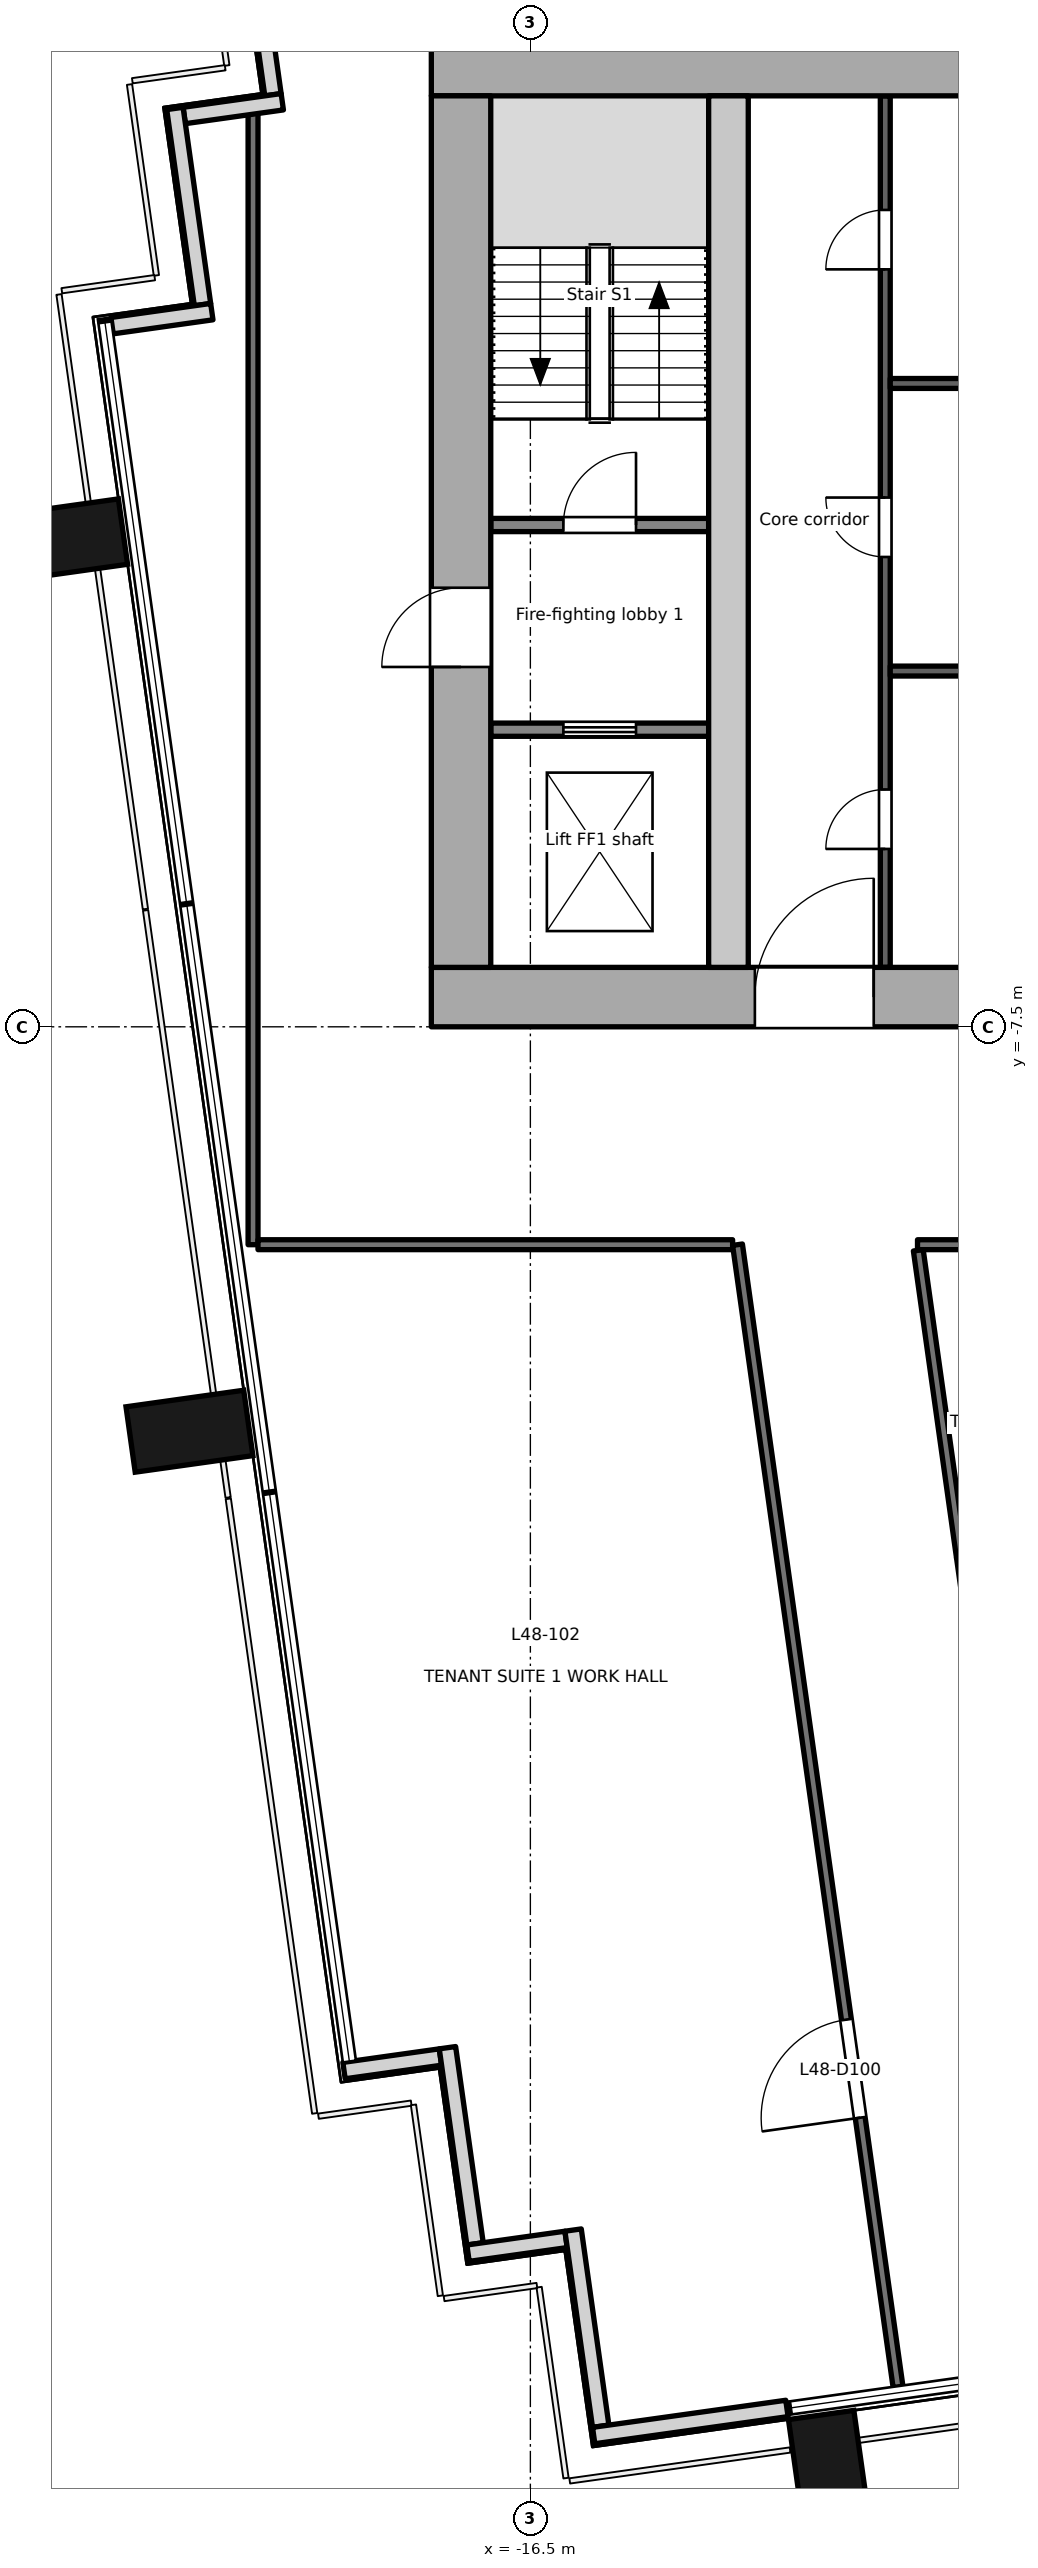
"""IFC4 building model, lengths in metres.
Left out: names, types, materials, properties, quantities, classifications, styles, units other than length and angle.
Written with IfcOpenShell. Run it as: python <this file> out.ifc"""

import sys

from ifc_helpers import new_model, si_unit, direction, frame, frame_2d, origin, origin_2d, place, context, subcontext, project, spatial, rectangle, extrude, element, fill, save


model = new_model("IFC4")
c1 = context("Model", 3, precision=1e-05, world=origin(), true_north=direction((0.0, 1.0)))
c2 = subcontext(c1, "Body", "Model", "MODEL_VIEW")
j1 = project(units=[si_unit("LENGTHUNIT", "METRE"), si_unit("PLANEANGLEUNIT", "RADIAN")], contexts=[c1])
p1 = place(None, origin())
s1 = spatial("IfcSite", under=j1, at=p1, CompositionType="ELEMENT")
p2 = place(p1, origin())
s2 = spatial("IfcBuilding", under=s1, at=p2, CompositionType="ELEMENT")
p3 = place(p2, frame((0.0, 0.0, 213.5)))
s3 = spatial("IfcBuildingStorey", under=s2, at=p3, CompositionType="ELEMENT", Elevation=213.5)
for number, where, z_axis, x_axis in (
    (1, (-11.971, -29.416, -0.2), (0.0, 0.0, 1.0), (0.99, 0.139, 0.0)),
    (2, (-21.663, -13.625, -0.2), (0.0, 0.0, 1.0), (-0.139, 0.99, 0.0)),
    (3, (-23.561, -0.125, -0.2), (0.0, 0.0, 1.0), (-0.139, 0.99, 0.0)),
):
    element("IfcColumn", number, at=place(p3, frame(where, z_axis=z_axis, x_axis=x_axis)), inside=s3, PredefinedType="COLUMN", context=c2, shape_type="SweptSolid", body=[
        extrude(rectangle(XDim=1.0, YDim=1.8, at=origin_2d()), origin(), (0.0, 0.0, 1.0), 3.9),
    ])
p4 = place(p3, frame((-20.815, 9.588, 0.0), z_axis=(0.0, 0.0, 1.0), x_axis=(0.138983028379, -0.9902947631, 0.0)))
e4 = element("IfcWall", 4, at=p4, inside=s3, PredefinedType="SOLIDWALL", context=c2, shape_type="SweptSolid", body=[
    extrude(rectangle(XDim=3.0, YDim=0.25, at=frame_2d((1.5, 0.0))), origin(), (0.0, 0.0, 1.0), 3.7),
])
p5 = place(p3, frame((-20.257, 6.51, 0.0), z_axis=(0.0, 0.0, 1.0), x_axis=(-0.990330117064, -0.138730887823, 0.0)))
e5 = element("IfcWall", 5, at=p5, inside=s3, PredefinedType="SOLIDWALL", context=c2, shape_type="SweptSolid", body=[
    extrude(rectangle(XDim=1.499, YDim=0.25, at=frame_2d((0.75, 0.0))), origin(), (0.0, 0.0, 1.0), 3.7),
])
p6 = place(p3, frame((-21.883, 6.409, 0.0), z_axis=(0.0, 0.0, 1.0), x_axis=(0.139324658755, -0.990246756855, 0.0)))
e6 = element("IfcWall", 6, at=p6, inside=s3, PredefinedType="SOLIDWALL", context=c2, shape_type="SweptSolid", body=[
    extrude(rectangle(XDim=3.0, YDim=0.25, at=frame_2d((1.5, 0.0))), origin(), (0.0, 0.0, 1.0), 3.7),
])
p7 = place(p3, frame((-21.324, 3.332, 0.0), z_axis=(0.0, 0.0, 1.0), x_axis=(-0.990238641016, -0.139382329723, 0.0)))
e7 = element("IfcWall", 7, at=p7, inside=s3, PredefinedType="SOLIDWALL", context=c2, shape_type="SweptSolid", body=[
    extrude(rectangle(XDim=1.526, YDim=0.25, at=frame_2d((0.763, 0.0))), origin(), (0.0, 0.0, 1.0), 3.7),
])
p8 = place(p3, frame((-19.322, -23.309, 0.0), z_axis=(0.0, 0.0, 1.0), x_axis=(0.990235520307, 0.13940449893, 0.0)))
e8 = element("IfcWall", 8, at=p8, inside=s3, PredefinedType="SOLIDWALL", context=c2, shape_type="SweptSolid", body=[
    extrude(rectangle(XDim=1.475, YDim=0.25, at=frame_2d((0.737, 0.0))), origin(), (0.0, 0.0, 1.0), 3.7),
])
p9 = place(p3, frame((-17.756, -22.962, 0.0), z_axis=(0.0, 0.0, 1.0), x_axis=(0.139393225799, -0.990237107263, 0.0)))
e9 = element("IfcWall", 9, at=p9, inside=s3, PredefinedType="SOLIDWALL", context=c2, shape_type="SweptSolid", body=[
    extrude(rectangle(XDim=3.0, YDim=0.25, at=frame_2d((1.5, 0.0))), origin(), (0.0, 0.0, 1.0), 3.7),
])
p10 = place(p3, frame((-17.444, -26.074, 0.0), z_axis=(0.0, 0.0, 1.0), x_axis=(0.990240434918, 0.139369584395, 0.0)))
e10 = element("IfcWall", 10, at=p10, inside=s3, PredefinedType="SOLIDWALL", context=c2, shape_type="SweptSolid", body=[
    extrude(rectangle(XDim=1.5, YDim=0.25, at=frame_2d((0.75, 0.0))), origin(), (0.0, 0.0, 1.0), 3.7),
])
p11 = place(p3, frame((-15.853, -25.724, 0.0), z_axis=(0.0, 0.0, 1.0), x_axis=(0.139302206688, -0.990249915532, 0.0)))
e11 = element("IfcWall", 11, at=p11, inside=s3, PredefinedType="SOLIDWALL", context=c2, shape_type="SweptSolid", body=[
    extrude(rectangle(XDim=3.0, YDim=0.25, at=frame_2d((1.5, 0.0))), origin(), (0.0, 0.0, 1.0), 3.7),
])
p12 = place(p3, frame((-15.541, -28.836, 0.0), z_axis=(0.0, 0.0, 1.0), x_axis=(0.990285396533, 0.139049751574, 0.0)))
e12 = element("IfcWall", 12, at=p12, inside=s3, PredefinedType="SOLIDWALL", context=c2, shape_type="SweptSolid", body=[
    extrude(rectangle(XDim=2.955, YDim=0.25, at=frame_2d((1.478, 0.0))), origin(), (0.0, 0.0, 1.0), 3.7),
])
p13 = place(p3, frame((-18.0, -7.05, -0.2), z_axis=(0.0, 0.0, 1.0), x_axis=(1.0, 0.0, 0.0)))
e13 = element("IfcWall", 13, at=p13, inside=s3, PredefinedType="SHEAR", context=c2, shape_type="SweptSolid", body=[
    extrude(rectangle(XDim=36.0, YDim=0.9, at=frame_2d((18.0, 0.0))), origin(), (0.0, 0.0, 1.0), 3.9),
])
p14 = place(p13, frame((4.9, 0.0, 0.2)))
e14 = element("IfcOpeningElement", 14, at=p14, cuts=e13, PredefinedType="OPENING", context=c2, shape_type="SweptSolid", body=[
    extrude(rectangle(XDim=1.8, YDim=2.1, at=frame_2d((0.9, 1.05))), frame((0.0, 0.46, 0.0), z_axis=(0.0, -1.0, 0.0), x_axis=(1.0, 0.0, 0.0)), (0.0, 0.0, 1.0), 0.921),
])
p15 = place(p13, frame((16.8, 0.0, 0.2)))
e15 = element("IfcOpeningElement", 15, at=p15, cuts=e13, PredefinedType="OPENING", context=c2, shape_type="SweptSolid", body=[
    extrude(rectangle(XDim=2.4, YDim=2.1, at=frame_2d((1.2, 1.05))), frame((0.0, 0.46, 0.0), z_axis=(0.0, -1.0, 0.0), x_axis=(1.0, 0.0, 0.0)), (0.0, 0.0, 1.0), 0.921),
])
p16 = place(p13, frame((26.1, 0.0, 0.2)))
e16 = element("IfcOpeningElement", 16, at=p16, cuts=e13, PredefinedType="OPENING", context=c2, shape_type="SweptSolid", body=[
    extrude(rectangle(XDim=2.4, YDim=2.1, at=frame_2d((1.2, 1.05))), frame((0.0, 0.46, 0.0), z_axis=(0.0, -1.0, 0.0), x_axis=(1.0, 0.0, 0.0)), (0.0, 0.0, 1.0), 0.921),
])
p17 = place(p3, frame((-18.0, 7.05, -0.2), z_axis=(0.0, 0.0, 1.0), x_axis=(1.0, 0.0, 0.0)))
e17 = element("IfcWall", 17, at=p17, inside=s3, PredefinedType="SHEAR", context=c2, shape_type="SweptSolid", body=[
    extrude(rectangle(XDim=36.0, YDim=0.9, at=frame_2d((18.0, 0.0))), origin(), (0.0, 0.0, 1.0), 3.9),
])
p18 = place(p3, frame((-17.55, -6.6, -0.2), z_axis=(0.0, 0.0, 1.0), x_axis=(0.0, 1.0, 0.0)))
e18 = element("IfcWall", 18, at=p18, inside=s3, PredefinedType="SHEAR", context=c2, shape_type="SweptSolid", body=[
    extrude(rectangle(XDim=13.2, YDim=0.9, at=frame_2d((6.6, 0.0))), origin(), (0.0, 0.0, 1.0), 3.9),
])
p19 = place(p18, frame((4.55, 0.0, 0.2)))
e19 = element("IfcOpeningElement", 19, at=p19, cuts=e18, PredefinedType="OPENING", context=c2, shape_type="SweptSolid", body=[
    extrude(rectangle(XDim=1.2, YDim=2.1, at=frame_2d((0.6, 1.05))), frame((0.0, 0.46, 0.0), z_axis=(0.0, -1.0, 0.0), x_axis=(1.0, 0.0, 0.0)), (0.0, 0.0, 1.0), 0.921),
])
p20 = place(p3, frame((-13.5, -6.6, -0.2), z_axis=(0.0, 0.0, 1.0), x_axis=(0.0, 1.0, 0.0)))
e20 = element("IfcWall", 20, at=p20, inside=s3, PredefinedType="SHEAR", context=c2, shape_type="SweptSolid", body=[
    extrude(rectangle(XDim=13.2, YDim=0.6, at=frame_2d((6.6, 0.0))), origin(), (0.0, 0.0, 1.0), 3.9),
])
p21 = place(p3, frame((-17.1, -3.0, 0.0), z_axis=(0.0, 0.0, 1.0), x_axis=(1.0, 0.0, 0.0)))
e21 = element("IfcWall", 21, at=p21, inside=s3, PredefinedType="PARTITIONING", context=c2, shape_type="SweptSolid", body=[
    extrude(rectangle(XDim=3.3, YDim=0.2, at=frame_2d((1.65, 0.0))), origin(), (0.0, 0.0, 1.0), 3.7),
])
p22 = place(p21, frame((1.1, 0.0, 0.0)))
e22 = element("IfcOpeningElement", 22, at=p22, cuts=e21, PredefinedType="OPENING", context=c2, shape_type="SweptSolid", body=[
    extrude(rectangle(XDim=1.1, YDim=2.1, at=frame_2d((0.55, 1.05))), frame((0.0, 0.111, 0.0), z_axis=(0.0, -1.0, 0.0), x_axis=(1.0, 0.0, 0.0)), (0.0, 0.0, 1.0), 0.221),
])
p23 = place(p3, frame((-17.1, 0.1, 0.0), z_axis=(0.0, 0.0, 1.0), x_axis=(1.0, 0.0, 0.0)))
e23 = element("IfcWall", 23, at=p23, inside=s3, PredefinedType="PARTITIONING", context=c2, shape_type="SweptSolid", body=[
    extrude(rectangle(XDim=3.3, YDim=0.2, at=frame_2d((1.65, 0.0))), origin(), (0.0, 0.0, 1.0), 3.7),
])
p24 = place(p23, frame((1.1, 0.0, 0.0)))
e24 = element("IfcOpeningElement", 24, at=p24, cuts=e23, PredefinedType="OPENING", context=c2, shape_type="SweptSolid", body=[
    extrude(rectangle(XDim=1.1, YDim=2.1, at=frame_2d((0.55, 1.05))), frame((0.0, 0.111, 0.0), z_axis=(0.0, -1.0, 0.0), x_axis=(1.0, 0.0, 0.0)), (0.0, 0.0, 1.0), 0.221),
])
p25 = place(p3, frame((-11.125, -6.6, 0.0), z_axis=(0.0, 0.0, 1.0), x_axis=(0.0, 1.0, 0.0)))
e25 = element("IfcWall", 25, at=p25, inside=s3, PredefinedType="PARTITIONING", context=c2, shape_type="SweptSolid", body=[
    extrude(rectangle(XDim=13.2, YDim=0.15, at=frame_2d((6.6, 0.0))), origin(), (0.0, 0.0, 1.0), 3.7),
])
p26 = place(p25, frame((1.794, 0.0, 0.0)))
e26 = element("IfcOpeningElement", 26, at=p26, cuts=e25, PredefinedType="OPENING", context=c2, shape_type="SweptSolid", body=[
    extrude(rectangle(XDim=0.9, YDim=2.1, at=frame_2d((0.45, 1.05))), frame((0.0, 0.085, 0.0), z_axis=(0.0, -1.0, 0.0), x_axis=(1.0, 0.0, 0.0)), (0.0, 0.0, 1.0), 0.171),
])
p27 = place(p25, frame((6.216, 0.0, 0.0)))
e27 = element("IfcOpeningElement", 27, at=p27, cuts=e25, PredefinedType="OPENING", context=c2, shape_type="SweptSolid", body=[
    extrude(rectangle(XDim=0.9, YDim=2.1, at=frame_2d((0.45, 1.05))), frame((0.0, 0.085, 0.0), z_axis=(0.0, -1.0, 0.0), x_axis=(1.0, 0.0, 0.0)), (0.0, 0.0, 1.0), 0.171),
])
p28 = place(p25, frame((10.572, 0.0, 0.0)))
e28 = element("IfcOpeningElement", 28, at=p28, cuts=e25, PredefinedType="OPENING", context=c2, shape_type="SweptSolid", body=[
    extrude(rectangle(XDim=0.9, YDim=2.1, at=frame_2d((0.45, 1.05))), frame((0.0, 0.085, 0.0), z_axis=(0.0, -1.0, 0.0), x_axis=(1.0, 0.0, 0.0)), (0.0, 0.0, 1.0), 0.171),
])
for number, where, z_axis, x_axis in (
    (29, (-11.05, -2.112, 0.0), (0.0, 0.0, 1.0), (1.0, 0.0, 0.0)),
    (30, (-11.05, 2.244, 0.0), (0.0, 0.0, 1.0), (1.0, 0.0, 0.0)),
):
    element("IfcWall", number, at=place(p3, frame(where, z_axis=z_axis, x_axis=x_axis)), inside=s3, PredefinedType="PARTITIONING", context=c2, shape_type="SweptSolid", body=[
        extrude(rectangle(XDim=6.25, YDim=0.15, at=frame_2d((3.125, 0.0))), origin(), (0.0, 0.0, 1.0), 3.7),
    ])
p29 = place(p3, frame((-20.7, -10.8, 0.0), z_axis=(0.0, 0.0, 1.0), x_axis=(0.0, 1.0, 0.0)))
e31 = element("IfcWall", 31, at=p29, inside=s3, PredefinedType="PARTITIONING", context=c2, shape_type="SweptSolid", body=[
    extrude(rectangle(XDim=17.156, YDim=0.15, at=frame_2d((8.578, 0.0))), origin(), (0.0, 0.0, 1.0), 3.4),
])
p30 = place(p3, frame((-13.437, -10.8, 0.0), z_axis=(0.0, 0.0, 1.0), x_axis=(-1.0, 0.0, 0.0)))
e32 = element("IfcWall", 32, at=p30, inside=s3, PredefinedType="PARTITIONING", context=c2, shape_type="SweptSolid", body=[
    extrude(rectangle(XDim=7.188, YDim=0.15, at=frame_2d((3.594, 0.0))), origin(), (0.0, 0.0, 1.0), 3.7),
])
p31 = place(p3, frame((-10.932, -28.099, 0.0), z_axis=(0.0, 0.0, 1.0), x_axis=(-0.139168963114, 0.990268650269, 0.0)))
e33 = element("IfcWall", 33, at=p31, inside=s3, PredefinedType="PARTITIONING", context=c2, shape_type="SweptSolid", body=[
    extrude(rectangle(XDim=17.469, YDim=0.15, at=frame_2d((8.734, 0.0))), origin(), (0.0, 0.0, 1.0), 3.7),
])
p32 = place(p31, frame((4.117, 0.0, 0.0)))
e34 = element("IfcOpeningElement", 34, at=p32, cuts=e33, PredefinedType="OPENING", context=c2, shape_type="SweptSolid", body=[
    extrude(rectangle(XDim=1.5, YDim=2.1, at=frame_2d((0.75, 1.05))), frame((0.0, 0.085, 0.0), z_axis=(0.0, -1.0, 0.0), x_axis=(1.0, 0.0, 0.0)), (0.0, 0.0, 1.0), 0.171),
])
p33 = place(p3, frame((-9.972, -15.533, 0.0), z_axis=(0.0, 0.0, 1.0), x_axis=(0.139149686673, -0.990271359123, 0.0)))
e35 = element("IfcWall", 35, at=p33, inside=s3, PredefinedType="PARTITIONING", context=c2, shape_type="SweptSolid", body=[
    extrude(rectangle(XDim=12.31, YDim=0.15, at=frame_2d((6.155, 0.0))), origin(), (0.0, 0.0, 1.0), 2.8),
])
p34 = place(p33, frame((7.757, 0.0, 0.0)))
e36 = element("IfcOpeningElement", 36, at=p34, cuts=e35, PredefinedType="OPENING", context=c2, shape_type="SweptSolid", body=[
    extrude(rectangle(XDim=1.8, YDim=2.1, at=frame_2d((0.9, 1.05))), frame((0.0, 0.085, 0.0), z_axis=(0.0, -1.0, 0.0), x_axis=(1.0, 0.0, 0.0)), (0.0, 0.0, 1.0), 0.171),
])
p35 = place(p3, frame((-10.625, -10.885, 0.0), z_axis=(0.0, 0.0, 1.0), x_axis=(0.139112996275, -0.990276514044, 0.0)))
e37 = element("IfcWall", 37, at=p35, inside=s3, PredefinedType="PARTITIONING", context=c2, shape_type="SweptSolid", body=[
    extrude(rectangle(XDim=4.695, YDim=0.15, at=frame_2d((2.347, 0.0))), origin(), (0.0, 0.0, 1.0), 3.7),
])
p36 = place(p3, frame((-4.557, -10.8, 0.0), z_axis=(0.0, 0.0, 1.0), x_axis=(-1.0, 0.0, 0.0)))
e38 = element("IfcWall", 38, at=p36, inside=s3, PredefinedType="PARTITIONING", context=c2, shape_type="SweptSolid", body=[
    extrude(rectangle(XDim=6.08, YDim=0.15, at=frame_2d((3.04, 0.0))), origin(), (0.0, 0.0, 1.0), 2.8),
])
p37 = place(p22, origin())
e39 = element("IfcDoor", 39, at=p37, inside=s3, OperationType="DOUBLE_DOOR_SLIDING", PredefinedType="DOOR", context=c2, shape_type="SweptSolid", body=[
    extrude(rectangle(XDim=1.1, YDim=2.1, at=frame_2d((0.55, 1.05))), frame((0.0, 0.025, 0.0), z_axis=(0.0, -1.0, 0.0), x_axis=(1.0, 0.0, 0.0)), (0.0, 0.0, 1.0), 0.05),
])
fill(e22, e39)
p38 = place(p19, origin())
e40 = element("IfcDoor", 40, at=p38, inside=s3, OperationType="SINGLE_SWING_LEFT", PredefinedType="DOOR", context=c2, shape_type="SweptSolid", body=[
    extrude(rectangle(XDim=1.2, YDim=2.1, at=frame_2d((0.6, 1.05))), frame((0.0, 0.025, 0.0), z_axis=(0.0, -1.0, 0.0), x_axis=(1.0, 0.0, 0.0)), (0.0, 0.0, 1.0), 0.05),
])
fill(e19, e40)
p39 = place(p24, origin())
e41 = element("IfcDoor", 41, at=p39, inside=s3, OperationType="SINGLE_SWING_RIGHT", PredefinedType="DOOR", context=c2, shape_type="SweptSolid", body=[
    extrude(rectangle(XDim=1.1, YDim=2.1, at=frame_2d((0.55, 1.05))), frame((0.0, 0.025, 0.0), z_axis=(0.0, -1.0, 0.0), x_axis=(1.0, 0.0, 0.0)), (0.0, 0.0, 1.0), 0.05),
])
fill(e24, e41)
p40 = place(p26, origin())
e42 = element("IfcDoor", 42, at=p40, inside=s3, OperationType="SINGLE_SWING_LEFT", PredefinedType="DOOR", context=c2, shape_type="SweptSolid", body=[
    extrude(rectangle(XDim=0.9, YDim=2.1, at=frame_2d((0.45, 1.05))), frame((0.0, 0.025, 0.0), z_axis=(0.0, -1.0, 0.0), x_axis=(1.0, 0.0, 0.0)), (0.0, 0.0, 1.0), 0.05),
])
fill(e26, e42)
p41 = place(p27, origin())
e43 = element("IfcDoor", 43, at=p41, inside=s3, OperationType="SINGLE_SWING_RIGHT", PredefinedType="DOOR", context=c2, shape_type="SweptSolid", body=[
    extrude(rectangle(XDim=0.9, YDim=2.1, at=frame_2d((0.45, 1.05))), frame((0.0, 0.025, 0.0), z_axis=(0.0, -1.0, 0.0), x_axis=(1.0, 0.0, 0.0)), (0.0, 0.0, 1.0), 0.05),
])
fill(e27, e43)
p42 = place(p28, origin())
e44 = element("IfcDoor", 44, at=p42, inside=s3, OperationType="SINGLE_SWING_LEFT", PredefinedType="DOOR", context=c2, shape_type="SweptSolid", body=[
    extrude(rectangle(XDim=0.9, YDim=2.1, at=frame_2d((0.45, 1.05))), frame((0.0, 0.025, 0.0), z_axis=(0.0, -1.0, 0.0), x_axis=(1.0, 0.0, 0.0)), (0.0, 0.0, 1.0), 0.05),
])
fill(e28, e44)
p43 = place(p14, origin())
e45 = element("IfcDoor", 45, at=p43, inside=s3, OperationType="SINGLE_SWING_RIGHT", PredefinedType="DOOR", context=c2, shape_type="SweptSolid", body=[
    extrude(rectangle(XDim=1.8, YDim=2.1, at=frame_2d((0.9, 1.05))), frame((0.0, 0.025, 0.0), z_axis=(0.0, -1.0, 0.0), x_axis=(1.0, 0.0, 0.0)), (0.0, 0.0, 1.0), 0.05),
])
fill(e14, e45)
p44 = place(p32, origin())
e46 = element("IfcDoor", 46, at=p44, inside=s3, OperationType="DOUBLE_DOOR_SINGLE_SWING", PredefinedType="DOOR", context=c2, shape_type="SweptSolid", body=[
    extrude(rectangle(XDim=1.5, YDim=2.1, at=frame_2d((0.75, 1.05))), frame((0.0, 0.025, 0.0), z_axis=(0.0, -1.0, 0.0), x_axis=(1.0, 0.0, 0.0)), (0.0, 0.0, 1.0), 0.05),
])
fill(e34, e46)
save(model, sys.argv[1])
